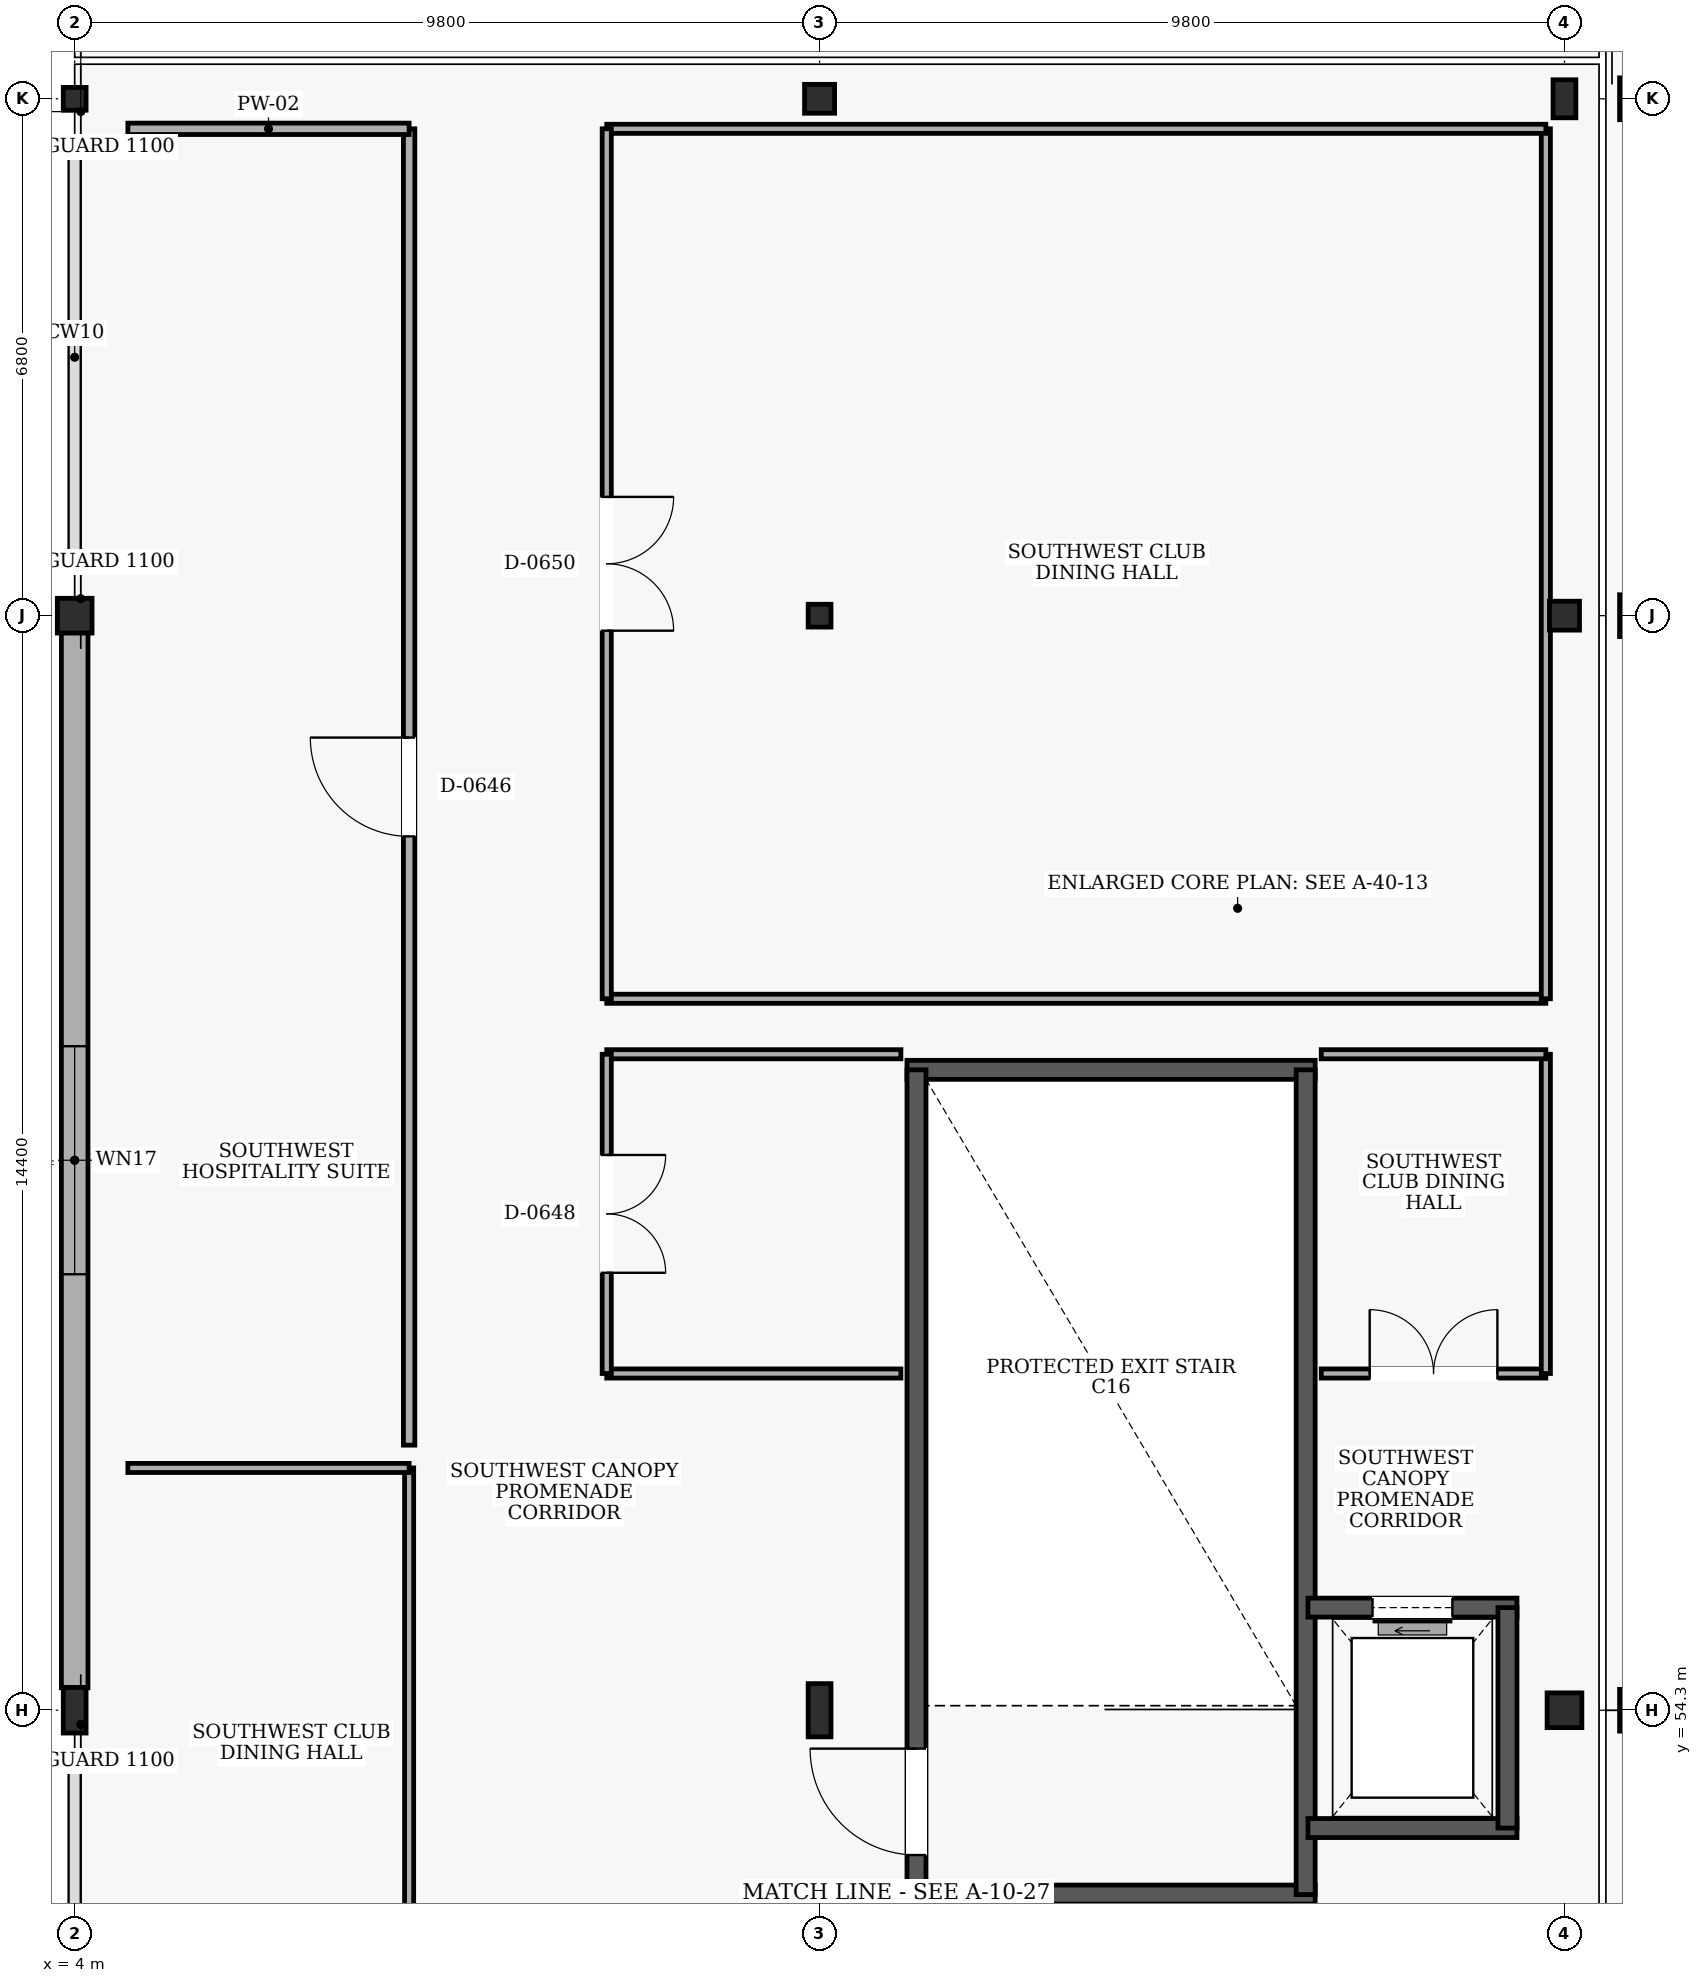
"""IFC4 building model, lengths in metres.
Left out: names, types, materials, properties, quantities, classifications, styles, units other than length and angle.
Written with IfcOpenShell. Run it as: python <this file> out.ifc"""

import sys

from ifc_helpers import new_model, si_unit, direction, frame, frame_2d, origin, origin_2d, place, context, subcontext, project, spatial, rectangle, hollow_rectangle, hollow_circle, i_section, extrude, element, fill, save


model = new_model("IFC4")
c1 = context("Model", 3, precision=1e-05, world=origin(), true_north=direction((0.0, 1.0)))
c2 = subcontext(c1, "Body", "Model", "MODEL_VIEW")
j1 = project(units=[si_unit("LENGTHUNIT", "METRE"), si_unit("PLANEANGLEUNIT", "RADIAN")], contexts=[c1])
p1 = place(None, origin())
s1 = spatial("IfcSite", under=j1, at=p1, CompositionType="ELEMENT")
p2 = place(p1, origin())
s2 = spatial("IfcBuilding", under=s1, at=p2, CompositionType="ELEMENT")
p3 = place(p2, frame((0.0, 0.0, 10.2)))
s3 = spatial("IfcBuildingStorey", under=s2, at=p3, CompositionType="ELEMENT", Elevation=10.2)
p4 = place(p3, frame((4.0, 54.3, 0.0), z_axis=(0.0, 0.0, 1.0), x_axis=(1.0, 0.0, 0.0)))
e1 = element("IfcColumn", 1, at=p4, inside=s3, PredefinedType="COLUMN", context=c2, shape_type="SweptSolid", body=[
    extrude(i_section(OverallWidth=0.3, OverallDepth=0.6, WebThickness=0.015, FlangeThickness=0.03, at=origin_2d()), origin(), (0.0, 0.0, 1.0), 4.8),
])
p5 = place(p3, frame((4.0, 68.7, 0.0), z_axis=(0.0, 0.0, 1.0), x_axis=(1.0, 0.0, 0.0)))
e2 = element("IfcColumn", 2, at=p5, inside=s3, PredefinedType="COLUMN", context=c2, shape_type="SweptSolid", body=[
    extrude(hollow_circle(Radius=0.229, WallThickness=0.02, at=origin_2d()), origin(), (0.0, 0.0, 1.0), 4.8),
])
p6 = place(p3, frame((4.0, 75.5, 0.0), z_axis=(0.0, 0.0, 1.0), x_axis=(1.0, 0.0, 0.0)))
e3 = element("IfcColumn", 3, at=p6, inside=s3, PredefinedType="COLUMN", context=c2, shape_type="SweptSolid", body=[
    extrude(hollow_rectangle(XDim=0.3, YDim=0.3, WallThickness=0.016, at=origin_2d()), origin(), (0.0, 0.0, 1.0), 4.8),
])
p7 = place(p3, frame((13.8, 54.3, 0.0), z_axis=(0.0, 0.0, 1.0), x_axis=(1.0, 0.0, 0.0)))
e4 = element("IfcColumn", 4, at=p7, inside=s3, PredefinedType="COLUMN", context=c2, shape_type="SweptSolid", body=[
    extrude(i_section(OverallWidth=0.3, OverallDepth=0.7, WebThickness=0.017, FlangeThickness=0.032, at=origin_2d()), origin(), (0.0, 0.0, 1.0), 4.8),
])
p8 = place(p3, frame((13.8, 68.7, 0.0), z_axis=(0.0, 0.0, 1.0), x_axis=(1.0, 0.0, 0.0)))
e5 = element("IfcColumn", 5, at=p8, inside=s3, PredefinedType="COLUMN", context=c2, shape_type="SweptSolid", body=[
    extrude(hollow_rectangle(XDim=0.3, YDim=0.3, WallThickness=0.016, at=origin_2d()), origin(), (0.0, 0.0, 1.0), 4.8),
])
p9 = place(p3, frame((13.8, 75.5, 0.0), z_axis=(0.0, 0.0, 1.0), x_axis=(1.0, 0.0, 0.0)))
e6 = element("IfcColumn", 6, at=p9, inside=s3, PredefinedType="COLUMN", context=c2, shape_type="SweptSolid", body=[
    extrude(i_section(OverallWidth=0.395, OverallDepth=0.38, WebThickness=0.019, FlangeThickness=0.03, at=origin_2d()), origin(), (0.0, 0.0, 1.0), 4.8),
])
p10 = place(p3, frame((23.6, 54.3, 0.0), z_axis=(0.0, 0.0, 1.0), x_axis=(1.0, 0.0, 0.0)))
e7 = element("IfcColumn", 7, at=p10, inside=s3, PredefinedType="COLUMN", context=c2, shape_type="SweptSolid", body=[
    extrude(hollow_circle(Radius=0.229, WallThickness=0.02, at=origin_2d()), origin(), (0.0, 0.0, 1.0), 4.8),
])
p11 = place(p3, frame((23.6, 68.7, 0.0), z_axis=(0.0, 0.0, 1.0), x_axis=(1.0, 0.0, 0.0)))
e8 = element("IfcColumn", 8, at=p11, inside=s3, PredefinedType="COLUMN", context=c2, shape_type="SweptSolid", body=[
    extrude(i_section(OverallWidth=0.395, OverallDepth=0.38, WebThickness=0.019, FlangeThickness=0.03, at=origin_2d()), origin(), (0.0, 0.0, 1.0), 4.8),
])
p12 = place(p3, frame((23.6, 75.5, 0.0), z_axis=(0.0, 0.0, 1.0), x_axis=(1.0, 0.0, 0.0)))
e9 = element("IfcColumn", 9, at=p12, inside=s3, PredefinedType="COLUMN", context=c2, shape_type="SweptSolid", body=[
    extrude(i_section(OverallWidth=0.3, OverallDepth=0.5, WebThickness=0.014, FlangeThickness=0.028, at=origin_2d()), origin(), (0.0, 0.0, 1.0), 4.8),
])
for number, where, z_axis, x_axis in (
    (10, (24.6, 54.3, 0.0), (0.0, 0.0, 1.0), (1.0, 0.0, 0.0)),
    (11, (24.6, 68.7, 0.0), (0.0, 0.0, 1.0), (1.0, 0.0, 0.0)),
    (12, (24.6, 75.5, 0.0), (0.0, 0.0, 1.0), (1.0, 0.0, 0.0)),
):
    element("IfcColumn", number, at=place(p3, frame(where, z_axis=z_axis, x_axis=x_axis)), inside=s3, PredefinedType="COLUMN", context=c2, shape_type="SweptSolid", body=[
        extrude(rectangle(XDim=0.55, YDim=0.55, at=origin_2d()), origin(), (0.0, 0.0, 1.0), 4.8),
    ])
p13 = place(p3, frame((4.0, 54.595, 0.0), z_axis=(0.0, 0.0, 1.0), x_axis=(0.0, 1.0, 0.0)))
e13 = element("IfcWall", 13, at=p13, inside=s3, PredefinedType="SOLIDWALL", context=c2, shape_type="SweptSolid", body=[
    extrude(rectangle(XDim=13.882, YDim=0.35, at=frame_2d((6.941, 0.0))), origin(), (0.0, 0.0, 1.0), 3.97),
])
p14 = place(p13, frame((5.441, 0.0, 0.9)))
e14 = element("IfcOpeningElement", 14, at=p14, cuts=e13, PredefinedType="OPENING", context=c2, shape_type="SweptSolid", body=[
    extrude(rectangle(XDim=3.0, YDim=2.1, at=frame_2d((1.5, 1.05))), frame((0.0, 0.185, 0.0), z_axis=(0.0, -1.0, 0.0), x_axis=(1.0, 0.0, 0.0)), (0.0, 0.0, 1.0), 0.37),
])
for number, where, z_axis, x_axis in (
    (15, (14.95, 51.875, 0.0), (0.0, 0.0, 1.0), (1.0, 0.0, 0.0)),
    (16, (20.32, 62.725, 0.0), (0.0, 0.0, 1.0), (-1.0, 0.0, 0.0)),
):
    element("IfcWall", number, at=place(p3, frame(where, z_axis=z_axis, x_axis=x_axis)), inside=s3, PredefinedType="SHEAR", context=c2, shape_type="SweptSolid", body=[
        extrude(rectangle(XDim=5.37, YDim=0.25, at=frame_2d((2.685, 0.0))), origin(), (0.0, 0.0, 1.0), 4.48),
    ])
p15 = place(p3, frame((15.075, 51.875, 0.0), z_axis=(0.0, 0.0, 1.0), x_axis=(0.0, 1.0, 0.0)))
e17 = element("IfcWall", 17, at=p15, inside=s3, PredefinedType="SHEAR", context=c2, shape_type="SweptSolid", body=[
    extrude(rectangle(XDim=10.85, YDim=0.25, at=frame_2d((5.425, 0.0))), origin(), (0.0, 0.0, 1.0), 4.48),
])
p16 = place(p15, frame((0.52, 0.0, 0.0)))
e18 = element("IfcOpeningElement", 18, at=p16, cuts=e17, PredefinedType="OPENING", context=c2, shape_type="SweptSolid", body=[
    extrude(rectangle(XDim=1.4, YDim=2.15, at=frame_2d((0.7, 1.075))), frame((0.0, 0.135, 0.0), z_axis=(0.0, -1.0, 0.0), x_axis=(1.0, 0.0, 0.0)), (0.0, 0.0, 1.0), 0.27),
])
p17 = place(p3, frame((20.195, 51.875, 0.0), z_axis=(0.0, 0.0, 1.0), x_axis=(0.0, 1.0, 0.0)))
e19 = element("IfcWall", 19, at=p17, inside=s3, PredefinedType="SHEAR", context=c2, shape_type="SweptSolid", body=[
    extrude(rectangle(XDim=10.85, YDim=0.25, at=frame_2d((5.425, 0.0))), origin(), (0.0, 0.0, 1.0), 4.48),
])
p18 = place(p3, frame((20.225, 52.75, 0.0), z_axis=(0.0, 0.0, 1.0), x_axis=(1.0, 0.0, 0.0)))
e20 = element("IfcWall", 20, at=p18, inside=s3, PredefinedType="SHEAR", context=c2, shape_type="SweptSolid", body=[
    extrude(rectangle(XDim=2.75, YDim=0.25, at=frame_2d((1.375, 0.0))), origin(), (0.0, 0.0, 1.0), 4.48),
])
p19 = place(p3, frame((22.975, 55.65, 0.0), z_axis=(0.0, 0.0, 1.0), x_axis=(-1.0, 0.0, 0.0)))
e21 = element("IfcWall", 21, at=p19, inside=s3, PredefinedType="SHEAR", context=c2, shape_type="SweptSolid", body=[
    extrude(rectangle(XDim=2.75, YDim=0.25, at=frame_2d((1.375, 0.0))), origin(), (0.0, 0.0, 1.0), 4.48),
])
p20 = place(p19, frame((0.85, 0.0, 0.0)))
e22 = element("IfcOpeningElement", 22, at=p20, cuts=e21, PredefinedType="OPENING", context=c2, shape_type="SweptSolid", body=[
    extrude(rectangle(XDim=1.05, YDim=2.15, at=frame_2d((0.525, 1.075))), frame((0.0, 0.135, 0.0), z_axis=(0.0, -1.0, 0.0), x_axis=(1.0, 0.0, 0.0)), (0.0, 0.0, 1.0), 0.27),
])
p21 = place(p3, frame((22.85, 52.75, 0.0), z_axis=(0.0, 0.0, 1.0), x_axis=(0.0, 1.0, 0.0)))
e23 = element("IfcWall", 23, at=p21, inside=s3, PredefinedType="SHEAR", context=c2, shape_type="SweptSolid", body=[
    extrude(rectangle(XDim=2.9, YDim=0.25, at=frame_2d((1.45, 0.0))), origin(), (0.0, 0.0, 1.0), 4.48),
])
p22 = place(p3, frame((8.4, 40.17, 0.0), z_axis=(0.0, 0.0, 1.0), x_axis=(0.0, 1.0, 0.0)))
e24 = element("IfcWall", 24, at=p22, inside=s3, PredefinedType="PARTITIONING", context=c2, shape_type="SweptSolid", body=[
    extrude(rectangle(XDim=17.318, YDim=0.12, at=frame_2d((8.659, 0.0))), origin(), (0.0, 0.0, 1.0), 4.48),
])
p23 = place(p22, frame((8.059, 0.0, 0.0)))
e25 = element("IfcOpeningElement", 25, at=p23, cuts=e24, PredefinedType="OPENING", context=c2, shape_type="SweptSolid", body=[
    extrude(rectangle(XDim=1.2, YDim=2.15, at=frame_2d((0.6, 1.075))), frame((0.0, 0.07, 0.0), z_axis=(0.0, -1.0, 0.0), x_axis=(1.0, 0.0, 0.0)), (0.0, 0.0, 1.0), 0.14),
])
p24 = place(p3, frame((8.4, 57.488, 0.0), z_axis=(0.0, 0.0, 1.0), x_axis=(-1.0, 0.0, 0.0)))
e26 = element("IfcWall", 26, at=p24, inside=s3, PredefinedType="PARTITIONING", context=c2, shape_type="SweptSolid", body=[
    extrude(rectangle(XDim=3.7, YDim=0.12, at=frame_2d((1.85, 0.0))), origin(), (0.0, 0.0, 1.0), 4.48),
])
p25 = place(p3, frame((8.4, 57.788, 0.0), z_axis=(0.0, 0.0, 1.0), x_axis=(0.0, 1.0, 0.0)))
e27 = element("IfcWall", 27, at=p25, inside=s3, PredefinedType="PARTITIONING", context=c2, shape_type="SweptSolid", body=[
    extrude(rectangle(XDim=17.317, YDim=0.15, at=frame_2d((8.659, 0.0))), origin(), (0.0, 0.0, 1.0), 4.48),
])
p26 = place(p25, frame((8.009, 0.0, 0.0)))
e28 = element("IfcOpeningElement", 28, at=p26, cuts=e27, PredefinedType="OPENING", context=c2, shape_type="SweptSolid", body=[
    extrude(rectangle(XDim=1.3, YDim=2.2, at=frame_2d((0.65, 1.1))), frame((0.0, 0.085, 0.0), z_axis=(0.0, -1.0, 0.0), x_axis=(1.0, 0.0, 0.0)), (0.0, 0.0, 1.0), 0.17),
])
p27 = place(p3, frame((8.4, 75.105, 0.0), z_axis=(0.0, 0.0, 1.0), x_axis=(-1.0, 0.0, 0.0)))
e29 = element("IfcWall", 29, at=p27, inside=s3, PredefinedType="PARTITIONING", context=c2, shape_type="SweptSolid", body=[
    extrude(rectangle(XDim=3.7, YDim=0.15, at=frame_2d((1.85, 0.0))), origin(), (0.0, 0.0, 1.0), 3.82),
])
for number, where, z_axis, x_axis in (
    (30, (11.0, 58.73, 0.0), (0.0, 0.0, 1.0), (1.0, 0.0, 0.0)),
    (31, (14.87, 62.93, 0.0), (0.0, 0.0, 1.0), (-1.0, 0.0, 0.0)),
):
    element("IfcWall", number, at=place(p3, frame(where, z_axis=z_axis, x_axis=x_axis)), inside=s3, PredefinedType="PARTITIONING", context=c2, shape_type="SweptSolid", body=[
        extrude(rectangle(XDim=3.87, YDim=0.12, at=frame_2d((1.935, 0.0))), origin(), (0.0, 0.0, 1.0), 4.48),
    ])
p28 = place(p3, frame((11.0, 62.93, 0.0), z_axis=(0.0, 0.0, 1.0), x_axis=(0.0, -1.0, 0.0)))
e32 = element("IfcWall", 32, at=p28, inside=s3, PredefinedType="PARTITIONING", context=c2, shape_type="SweptSolid", body=[
    extrude(rectangle(XDim=4.2, YDim=0.12, at=frame_2d((2.1, 0.0))), origin(), (0.0, 0.0, 1.0), 4.48),
])
p29 = place(p28, frame((1.325, 0.0, 0.0)))
e33 = element("IfcOpeningElement", 33, at=p29, cuts=e32, PredefinedType="OPENING", context=c2, shape_type="SweptSolid", body=[
    extrude(rectangle(XDim=1.55, YDim=2.2, at=frame_2d((0.775, 1.1))), frame((0.0, 0.07, 0.0), z_axis=(0.0, -1.0, 0.0), x_axis=(1.0, 0.0, 0.0)), (0.0, 0.0, 1.0), 0.14),
])
p30 = place(p3, frame((20.4, 58.73, 0.0), z_axis=(0.0, 0.0, 1.0), x_axis=(1.0, 0.0, 0.0)))
e34 = element("IfcWall", 34, at=p30, inside=s3, PredefinedType="PARTITIONING", context=c2, shape_type="SweptSolid", body=[
    extrude(rectangle(XDim=2.955, YDim=0.12, at=frame_2d((1.478, 0.0))), origin(), (0.0, 0.0, 1.0), 4.48),
])
p31 = place(p30, frame((0.637, 0.0, 0.0)))
e35 = element("IfcOpeningElement", 35, at=p31, cuts=e34, PredefinedType="OPENING", context=c2, shape_type="SweptSolid", body=[
    extrude(rectangle(XDim=1.68, YDim=2.25, at=frame_2d((0.84, 1.125))), frame((0.0, 0.07, 0.0), z_axis=(0.0, -1.0, 0.0), x_axis=(1.0, 0.0, 0.0)), (0.0, 0.0, 1.0), 0.14),
])
p32 = place(p3, frame((23.355, 58.73, 0.0), z_axis=(0.0, 0.0, 1.0), x_axis=(0.0, 1.0, 0.0)))
e36 = element("IfcWall", 36, at=p32, inside=s3, PredefinedType="PARTITIONING", context=c2, shape_type="SweptSolid", body=[
    extrude(rectangle(XDim=4.2, YDim=0.12, at=frame_2d((2.1, 0.0))), origin(), (0.0, 0.0, 1.0), 3.97),
])
p33 = place(p3, frame((23.355, 62.93, 0.0), z_axis=(0.0, 0.0, 1.0), x_axis=(-1.0, 0.0, 0.0)))
e37 = element("IfcWall", 37, at=p33, inside=s3, PredefinedType="PARTITIONING", context=c2, shape_type="SweptSolid", body=[
    extrude(rectangle(XDim=2.955, YDim=0.12, at=frame_2d((1.478, 0.0))), origin(), (0.0, 0.0, 1.0), 4.48),
])
p34 = place(p3, frame((11.0, 63.66, 0.0), z_axis=(0.0, 0.0, 1.0), x_axis=(1.0, 0.0, 0.0)))
e38 = element("IfcWall", 38, at=p34, inside=s3, PredefinedType="PARTITIONING", context=c2, shape_type="SweptSolid", body=[
    extrude(rectangle(XDim=12.355, YDim=0.12, at=frame_2d((6.177, 0.0))), origin(), (0.0, 0.0, 1.0), 4.48),
])
p35 = place(p3, frame((23.355, 63.66, 0.0), z_axis=(0.0, 0.0, 1.0), x_axis=(0.0, 1.0, 0.0)))
e39 = element("IfcWall", 39, at=p35, inside=s3, PredefinedType="PARTITIONING", context=c2, shape_type="SweptSolid", body=[
    extrude(rectangle(XDim=11.445, YDim=0.12, at=frame_2d((5.723, 0.0))), origin(), (0.0, 0.0, 1.0), 3.72),
])
p36 = place(p3, frame((23.355, 75.105, 0.0), z_axis=(0.0, 0.0, 1.0), x_axis=(-1.0, 0.0, 0.0)))
e40 = element("IfcWall", 40, at=p36, inside=s3, PredefinedType="PARTITIONING", context=c2, shape_type="SweptSolid", body=[
    extrude(rectangle(XDim=12.355, YDim=0.12, at=frame_2d((6.177, 0.0))), origin(), (0.0, 0.0, 1.0), 3.82),
])
p37 = place(p3, frame((11.0, 75.105, 0.0), z_axis=(0.0, 0.0, 1.0), x_axis=(0.0, -1.0, 0.0)))
e41 = element("IfcWall", 41, at=p37, inside=s3, PredefinedType="PARTITIONING", context=c2, shape_type="SweptSolid", body=[
    extrude(rectangle(XDim=11.445, YDim=0.12, at=frame_2d((5.723, 0.0))), origin(), (0.0, 0.0, 1.0), 4.48),
])
p38 = place(p37, frame((4.843, 0.0, 0.0)))
e42 = element("IfcOpeningElement", 42, at=p38, cuts=e41, PredefinedType="OPENING", context=c2, shape_type="SweptSolid", body=[
    extrude(rectangle(XDim=1.76, YDim=2.25, at=frame_2d((0.88, 1.125))), frame((0.0, 0.07, 0.0), z_axis=(0.0, -1.0, 0.0), x_axis=(1.0, 0.0, 0.0)), (0.0, 0.0, 1.0), 0.14),
])
p39 = place(p14, origin())
e43 = element("IfcWindow", 43, at=p39, inside=s3, PartitioningType="SINGLE_PANEL", PredefinedType="WINDOW", context=c2, shape_type="SweptSolid", body=[
    extrude(rectangle(XDim=3.0, YDim=2.1, at=frame_2d((1.5, 1.05))), frame((0.0, 0.03, 0.0), z_axis=(0.0, -1.0, 0.0), x_axis=(1.0, 0.0, 0.0)), (0.0, 0.0, 1.0), 0.06),
])
fill(e14, e43)
p40 = place(p16, frame((1.4, 0.0, 0.0), z_axis=(0.0, 0.0, 1.0), x_axis=(-1.0, 0.0, 0.0)))
e44 = element("IfcDoor", 44, at=p40, inside=s3, OperationType="SINGLE_SWING_LEFT", PredefinedType="DOOR", context=c2, shape_type="SweptSolid", body=[
    extrude(rectangle(XDim=1.4, YDim=2.15, at=frame_2d((0.7, 1.075))), frame((0.0, 0.025, 0.0), z_axis=(0.0, -1.0, 0.0), x_axis=(1.0, 0.0, 0.0)), (0.0, 0.0, 1.0), 0.05),
])
fill(e18, e44)
p41 = place(p20, origin())
e45 = element("IfcDoor", 45, at=p41, inside=s3, OperationType="SLIDING_TO_LEFT", PredefinedType="DOOR", context=c2, shape_type="SweptSolid", body=[
    extrude(rectangle(XDim=1.05, YDim=2.15, at=frame_2d((0.525, 1.075))), frame((0.0, 0.025, 0.0), z_axis=(0.0, -1.0, 0.0), x_axis=(1.0, 0.0, 0.0)), (0.0, 0.0, 1.0), 0.05),
])
fill(e22, e45)
p42 = place(p26, origin())
e46 = element("IfcDoor", 46, at=p42, inside=s3, OperationType="SINGLE_SWING_RIGHT", PredefinedType="DOOR", context=c2, shape_type="SweptSolid", body=[
    extrude(rectangle(XDim=1.3, YDim=2.2, at=frame_2d((0.65, 1.1))), frame((0.0, 0.025, 0.0), z_axis=(0.0, -1.0, 0.0), x_axis=(1.0, 0.0, 0.0)), (0.0, 0.0, 1.0), 0.05),
])
fill(e28, e46)
p43 = place(p29, origin())
e47 = element("IfcDoor", 47, at=p43, inside=s3, OperationType="DOUBLE_DOOR_SINGLE_SWING", PredefinedType="DOOR", context=c2, shape_type="SweptSolid", body=[
    extrude(rectangle(XDim=1.55, YDim=2.2, at=frame_2d((0.775, 1.1))), frame((0.0, 0.025, 0.0), z_axis=(0.0, -1.0, 0.0), x_axis=(1.0, 0.0, 0.0)), (0.0, 0.0, 1.0), 0.05),
])
fill(e33, e47)
p44 = place(p31, origin())
e48 = element("IfcDoor", 48, at=p44, inside=s3, OperationType="DOUBLE_DOOR_SINGLE_SWING", PredefinedType="DOOR", context=c2, shape_type="SweptSolid", body=[
    extrude(rectangle(XDim=1.68, YDim=2.25, at=frame_2d((0.84, 1.125))), frame((0.0, 0.025, 0.0), z_axis=(0.0, -1.0, 0.0), x_axis=(1.0, 0.0, 0.0)), (0.0, 0.0, 1.0), 0.05),
])
fill(e35, e48)
p45 = place(p38, origin())
e49 = element("IfcDoor", 49, at=p45, inside=s3, OperationType="DOUBLE_DOOR_SINGLE_SWING", PredefinedType="DOOR", context=c2, shape_type="SweptSolid", body=[
    extrude(rectangle(XDim=1.76, YDim=2.25, at=frame_2d((0.88, 1.125))), frame((0.0, 0.025, 0.0), z_axis=(0.0, -1.0, 0.0), x_axis=(1.0, 0.0, 0.0)), (0.0, 0.0, 1.0), 0.05),
])
fill(e42, e49)
save(model, sys.argv[1])
